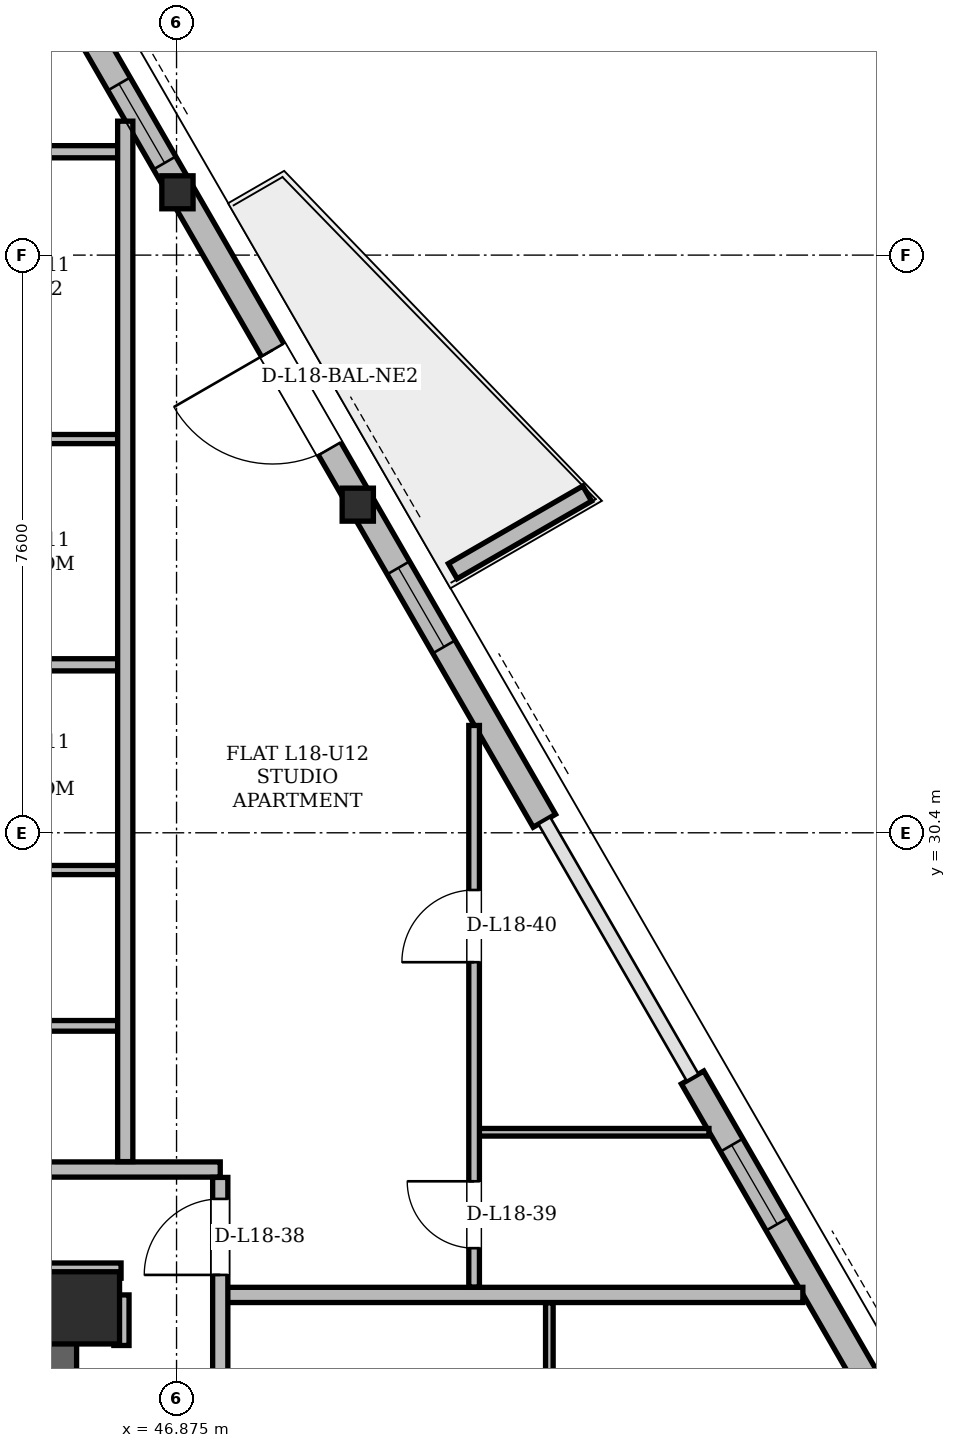
"""IFC4 building model, lengths in metres.
Left out: names, types, materials, properties, quantities, classifications, styles, units other than length and angle.
Written with IfcOpenShell. Run it as: python <this file> out.ifc"""

import sys

from ifc_helpers import new_model, si_unit, direction, frame, frame_2d, origin, origin_2d, place, context, subcontext, project, spatial, polyline, rectangle, hollow_rectangle, i_section, outline, extrude, element, fill, save


model = new_model("IFC4")
c1 = context("Model", 3, precision=1e-05, world=origin(), true_north=direction((0.0, 1.0)))
c2 = subcontext(c1, "Body", "Model", "MODEL_VIEW")
j1 = project(units=[si_unit("LENGTHUNIT", "METRE"), si_unit("PLANEANGLEUNIT", "RADIAN")], contexts=[c1])
p1 = place(None, origin())
s1 = spatial("IfcSite", under=j1, at=p1, CompositionType="ELEMENT")
p2 = place(p1, origin())
s2 = spatial("IfcBuilding", under=s1, at=p2, CompositionType="ELEMENT")
p3 = place(p2, frame((0.0, 0.0, 70.5)))
s3 = spatial("IfcBuildingStorey", under=s2, at=p3, CompositionType="ELEMENT", Elevation=70.5)
p4 = place(p3, frame((45.65, 24.15, 0.0), z_axis=(0.0, 0.0, 1.0), x_axis=(1.0, 0.0, 0.0)))
e1 = element("IfcColumn", 1, at=p4, inside=s3, PredefinedType="COLUMN", context=c2, shape_type="SweptSolid", body=[
    extrude(hollow_rectangle(XDim=0.95, YDim=0.95, WallThickness=0.08, at=origin_2d()), origin(), (0.0, 0.0, 1.0), 3.6),
])
p5 = place(p3, frame((49.304, 34.733, 0.004), z_axis=(-0.025009878433, -0.008902973029, 0.999647559419), x_axis=(0.335363176575, -0.942088923509, 0.0)))
e2 = element("IfcColumn", 2, at=p5, inside=s3, PredefinedType="COLUMN", context=c2, shape_type="SweptSolid", body=[
    extrude(i_section(OverallWidth=0.411, OverallDepth=0.434, WebThickness=0.036, FlangeThickness=0.057, at=origin_2d()), origin(), (0.0, 0.0, 1.0), 3.592),
])
p6 = place(p3, frame((46.935, 38.837, 0.004), z_axis=(-0.026708337266, -0.005912532677, 0.99962578332), x_axis=(0.216141230312, -0.976362109342, 0.0)))
e3 = element("IfcColumn", 3, at=p6, inside=s3, PredefinedType="COLUMN", context=c2, shape_type="SweptSolid", body=[
    extrude(i_section(OverallWidth=0.411, OverallDepth=0.434, WebThickness=0.036, FlangeThickness=0.057, at=origin_2d()), origin(), (0.0, 0.0, 1.0), 3.593),
])
p7 = place(p3, frame((45.31, 11.0, 0.0), z_axis=(0.0, 0.0, 1.0), x_axis=(0.0, 1.0, 0.0)))
e4 = element("IfcWall", 4, at=p7, inside=s3, PredefinedType="SHEAR", context=c2, shape_type="SweptSolid", body=[
    extrude(rectangle(XDim=13.3, YDim=0.5, at=frame_2d((6.65, 0.0))), origin(), (0.0, 0.0, 1.0), 3.36),
])
p8 = place(p3, frame((29.65, 24.15, 0.0), z_axis=(0.0, 0.0, 1.0), x_axis=(1.0, 0.0, 0.0)))
e5 = element("IfcWall", 5, at=p8, inside=s3, PredefinedType="SHEAR", context=c2, shape_type="SweptSolid", body=[
    extrude(rectangle(XDim=15.7, YDim=0.3, at=frame_2d((7.85, 0.0))), origin(), (0.0, 0.0, 1.0), 3.36),
])
p9 = place(p8, frame((1.7, 0.0, 0.0)))
e6 = element("IfcOpeningElement", 6, at=p9, cuts=e5, PredefinedType="OPENING", context=c2, shape_type="SweptSolid", body=[
    extrude(rectangle(XDim=1.2, YDim=2.2, at=frame_2d((0.6, 1.1))), frame((0.0, 0.15, 0.0), z_axis=(0.0, -1.0, 0.0), x_axis=(1.0, 0.0, 0.0)), (0.0, 0.0, 1.0), 0.3),
])
p10 = place(p8, frame((12.8, 0.0, 0.0)))
e7 = element("IfcOpeningElement", 7, at=p10, cuts=e5, PredefinedType="OPENING", context=c2, shape_type="SweptSolid", body=[
    extrude(rectangle(XDim=1.2, YDim=2.2, at=frame_2d((0.6, 1.1))), frame((0.0, 0.15, 0.0), z_axis=(0.0, -1.0, 0.0), x_axis=(1.0, 0.0, 0.0)), (0.0, 0.0, 1.0), 0.3),
])
p11 = place(p8, frame((7.4, 0.0, 0.0)))
e8 = element("IfcOpeningElement", 8, at=p11, cuts=e5, PredefinedType="OPENING", context=c2, shape_type="SweptSolid", body=[
    extrude(rectangle(XDim=0.9, YDim=2.05, at=frame_2d((0.45, 1.025))), frame((0.0, 0.15, 0.0), z_axis=(0.0, -1.0, 0.0), x_axis=(1.0, 0.0, 0.0)), (0.0, 0.0, 1.0), 0.3),
])
p12 = place(p3, frame((61.152, 14.212, 0.0), z_axis=(0.0, 0.0, 1.0), x_axis=(-0.499999987774, 0.866025410843, 0.0)))
e9 = element("IfcWall", 9, at=p12, inside=s3, PredefinedType="SOLIDWALL", context=c2, shape_type="SweptSolid", body=[
    extrude(rectangle(XDim=14.976, YDim=0.34, at=frame_2d((7.488, 0.0))), origin(), (0.0, 0.0, 1.0), 2.494),
])
p13 = place(p12, frame((6.369, 0.0, 0.0)))
e10 = element("IfcOpeningElement", 10, at=p13, cuts=e9, PredefinedType="OPENING", context=c2, shape_type="SweptSolid", body=[
    extrude(rectangle(XDim=1.5, YDim=2.2, at=frame_2d((0.75, 1.1))), frame((0.0, 0.17, 0.0), z_axis=(0.0, -1.0, 0.0), x_axis=(1.0, 0.0, 0.0)), (0.0, 0.0, 1.0), 0.34),
])
p14 = place(p12, frame((1.458, 0.0, 0.85)))
e11 = element("IfcOpeningElement", 11, at=p14, cuts=e9, PredefinedType="OPENING", context=c2, shape_type="SweptSolid", body=[
    extrude(rectangle(XDim=2.2, YDim=1.534, at=frame_2d((1.1, 0.767))), frame((0.0, 0.17, 0.0), z_axis=(0.0, -1.0, 0.0), x_axis=(1.0, 0.0, 0.0)), (0.0, 0.0, 1.0), 0.34),
])
p15 = place(p12, frame((12.748, 0.0, 0.85)))
e12 = element("IfcOpeningElement", 12, at=p15, cuts=e9, PredefinedType="OPENING", context=c2, shape_type="SweptSolid", body=[
    extrude(rectangle(XDim=1.2, YDim=1.48, at=frame_2d((0.6, 0.74))), frame((0.0, 0.17, 0.0), z_axis=(0.0, -1.0, 0.0), x_axis=(1.0, 0.0, 0.0)), (0.0, 0.0, 1.0), 0.34),
])
p16 = place(p3, frame((51.715, 30.558, 0.0), z_axis=(0.0, 0.0, 1.0), x_axis=(-0.499992928635, 0.8660294864, 0.0)))
e13 = element("IfcWall", 13, at=p16, inside=s3, PredefinedType="SOLIDWALL", context=c2, shape_type="SweptSolid", body=[
    extrude(rectangle(XDim=14.976, YDim=0.34, at=frame_2d((7.488, 0.0))), origin(), (0.0, 0.0, 1.0), 2.494),
])
p17 = place(p16, frame((5.651, 0.0, 0.0)))
e14 = element("IfcOpeningElement", 14, at=p17, cuts=e13, PredefinedType="OPENING", context=c2, shape_type="SweptSolid", body=[
    extrude(rectangle(XDim=1.5, YDim=2.2, at=frame_2d((0.75, 1.1))), frame((0.0, 0.17, 0.0), z_axis=(0.0, -1.0, 0.0), x_axis=(1.0, 0.0, 0.0)), (0.0, 0.0, 1.0), 0.34),
])
p18 = place(p16, frame((12.663, 0.0, 0.85)))
e15 = element("IfcOpeningElement", 15, at=p18, cuts=e13, PredefinedType="OPENING", context=c2, shape_type="SweptSolid", body=[
    extrude(rectangle(XDim=1.2, YDim=1.48, at=frame_2d((0.6, 0.74))), frame((0.0, 0.17, 0.0), z_axis=(0.0, -1.0, 0.0), x_axis=(1.0, 0.0, 0.0)), (0.0, 0.0, 1.0), 0.34),
])
p19 = place(p16, frame((2.642, 0.0, 0.85)))
e16 = element("IfcOpeningElement", 16, at=p19, cuts=e13, PredefinedType="OPENING", context=c2, shape_type="SweptSolid", body=[
    extrude(rectangle(XDim=1.2, YDim=1.48, at=frame_2d((0.6, 0.74))), frame((0.0, 0.17, 0.0), z_axis=(0.0, -1.0, 0.0), x_axis=(1.0, 0.0, 0.0)), (0.0, 0.0, 1.0), 0.34),
])
p20 = place(p16, frame((9.993, 0.0, 0.85)))
e17 = element("IfcOpeningElement", 17, at=p20, cuts=e13, PredefinedType="OPENING", context=c2, shape_type="SweptSolid", body=[
    extrude(rectangle(XDim=1.2, YDim=1.48, at=frame_2d((0.6, 0.74))), frame((0.0, 0.17, 0.0), z_axis=(0.0, -1.0, 0.0), x_axis=(1.0, 0.0, 0.0)), (0.0, 0.0, 1.0), 0.34),
])
p21 = place(p3, frame((50.509, 33.842, 0.0), z_axis=(0.0, 0.0, 1.0), x_axis=(0.866012356593, 0.500022597718, 0.0)))
e18 = element("IfcWall", 18, at=p21, inside=s3, PredefinedType="PARAPET", context=c2, shape_type="SweptSolid", body=[
    extrude(outline(polyline([(0.0, 0.0), (2.042, 0.0), (2.042, 1.1), (0.0, 1.32), (0.0, 0.0)])), frame((0.0, 0.115, 0.0), z_axis=(0.0, -1.0, 0.0), x_axis=(1.0, 0.0, 0.0)), (0.0, 0.0, 1.0), 0.23),
])
p22 = place(p3, frame((47.45, 24.32, 0.0), z_axis=(0.0, 0.0, 1.0), x_axis=(1.0, 0.0, 0.0)))
e19 = element("IfcWall", 19, at=p22, inside=s3, PredefinedType="PARTITIONING", context=c2, shape_type="SweptSolid", body=[
    extrude(rectangle(XDim=7.666, YDim=0.2, at=frame_2d((3.833, 0.0))), origin(), (0.0, 0.0, 1.0), 2.494),
])
p23 = place(p3, frame((45.155, 24.64, 0.0), z_axis=(0.0, 0.0, 1.0), x_axis=(1.0, 0.0, 0.0)))
e20 = element("IfcWall", 20, at=p23, inside=s3, PredefinedType="PARTITIONING", context=c2, shape_type="SweptSolid", body=[
    extrude(rectangle(XDim=0.99, YDim=0.2, at=frame_2d((0.495, 0.0))), origin(), (0.0, 0.0, 1.0), 2.738),
])
p24 = place(p3, frame((27.55, 25.97, 0.0), z_axis=(0.0, 0.0, 1.0), x_axis=(1.0, 0.0, 0.0)))
e21 = element("IfcWall", 21, at=p24, inside=s3, PredefinedType="PARTITIONING", context=c2, shape_type="SweptSolid", body=[
    extrude(rectangle(XDim=19.9, YDim=0.2, at=frame_2d((9.95, 0.0))), origin(), (0.0, 0.0, 1.0), 2.738),
])
p25 = place(p24, frame((0.425, 0.0, 0.0)))
e22 = element("IfcOpeningElement", 22, at=p25, cuts=e21, PredefinedType="OPENING", context=c2, shape_type="SweptSolid", body=[
    extrude(rectangle(XDim=1.0, YDim=2.18, at=frame_2d((0.5, 1.09))), frame((0.0, 0.1, 0.0), z_axis=(0.0, -1.0, 0.0), x_axis=(1.0, 0.0, 0.0)), (0.0, 0.0, 1.0), 0.2),
])
p26 = place(p24, frame((4.347, 0.0, 0.0)))
e23 = element("IfcOpeningElement", 23, at=p26, cuts=e21, PredefinedType="OPENING", context=c2, shape_type="SweptSolid", body=[
    extrude(rectangle(XDim=1.0, YDim=2.18, at=frame_2d((0.5, 1.09))), frame((0.0, 0.1, 0.0), z_axis=(0.0, -1.0, 0.0), x_axis=(1.0, 0.0, 0.0)), (0.0, 0.0, 1.0), 0.2),
])
p27 = place(p24, frame((12.208, 0.0, 0.0)))
e24 = element("IfcOpeningElement", 24, at=p27, cuts=e21, PredefinedType="OPENING", context=c2, shape_type="SweptSolid", body=[
    extrude(rectangle(XDim=1.0, YDim=2.18, at=frame_2d((0.5, 1.09))), frame((0.0, 0.1, 0.0), z_axis=(0.0, -1.0, 0.0), x_axis=(1.0, 0.0, 0.0)), (0.0, 0.0, 1.0), 0.2),
])
p28 = place(p3, frame((50.793, 26.46, 0.0), z_axis=(0.0, 0.0, 1.0), x_axis=(1.0, 0.0, 0.0)))
e25 = element("IfcWall", 25, at=p28, inside=s3, PredefinedType="PARTITIONING", context=c2, shape_type="SweptSolid", body=[
    extrude(rectangle(XDim=3.087, YDim=0.1, at=frame_2d((1.543, 0.0))), origin(), (0.0, 0.0, 1.0), 3.36),
])
p29 = place(p3, frame((41.87, 27.86, 0.0), z_axis=(0.0, 0.0, 1.0), x_axis=(1.0, 0.0, 0.0)))
e26 = element("IfcWall", 26, at=p29, inside=s3, PredefinedType="PARTITIONING", context=c2, shape_type="SweptSolid", body=[
    extrude(rectangle(XDim=4.38, YDim=0.14, at=frame_2d((2.19, 0.0))), origin(), (0.0, 0.0, 1.0), 2.738),
])
p30 = place(p3, frame((41.87, 29.91, 0.0), z_axis=(0.0, 0.0, 1.0), x_axis=(1.0, 0.0, 0.0)))
e27 = element("IfcWall", 27, at=p30, inside=s3, PredefinedType="PARTITIONING", context=c2, shape_type="SweptSolid", body=[
    extrude(rectangle(XDim=4.38, YDim=0.12, at=frame_2d((2.19, 0.0))), origin(), (0.0, 0.0, 1.0), 2.738),
])
p31 = place(p3, frame((41.87, 32.61, 0.0), z_axis=(0.0, 0.0, 1.0), x_axis=(1.0, 0.0, 0.0)))
e28 = element("IfcWall", 28, at=p31, inside=s3, PredefinedType="PARTITIONING", context=c2, shape_type="SweptSolid", body=[
    extrude(rectangle(XDim=4.38, YDim=0.16, at=frame_2d((2.19, 0.0))), origin(), (0.0, 0.0, 1.0), 2.738),
])
p32 = place(p3, frame((41.87, 35.58, 0.0), z_axis=(0.0, 0.0, 1.0), x_axis=(1.0, 0.0, 0.0)))
e29 = element("IfcWall", 29, at=p32, inside=s3, PredefinedType="PARTITIONING", context=c2, shape_type="SweptSolid", body=[
    extrude(rectangle(XDim=4.38, YDim=0.12, at=frame_2d((2.19, 0.0))), origin(), (0.0, 0.0, 1.0), 2.738),
])
p33 = place(p3, frame((41.87, 39.36, 0.0), z_axis=(0.0, 0.0, 1.0), x_axis=(1.0, 0.0, 0.0)))
e30 = element("IfcWall", 30, at=p33, inside=s3, PredefinedType="PARTITIONING", context=c2, shape_type="SweptSolid", body=[
    extrude(rectangle(XDim=4.38, YDim=0.16, at=frame_2d((2.19, 0.0))), origin(), (0.0, 0.0, 1.0), 2.738),
])
p34 = place(p3, frame((46.15, 23.655, 0.0), z_axis=(0.0, 0.0, 1.0), x_axis=(0.0, 1.0, 0.0)))
e31 = element("IfcWall", 31, at=p34, inside=s3, PredefinedType="PARTITIONING", context=c2, shape_type="SweptSolid", body=[
    extrude(rectangle(XDim=0.665, YDim=0.2, at=frame_2d((0.333, 0.0))), origin(), (0.0, 0.0, 1.0), 2.946),
])
p35 = place(p3, frame((46.2, 26.074, 0.0), z_axis=(0.0, 0.0, 1.0), x_axis=(0.0, 1.0, 0.0)))
e32 = element("IfcWall", 32, at=p35, inside=s3, PredefinedType="PARTITIONING", context=c2, shape_type="SweptSolid", body=[
    extrude(rectangle(XDim=13.688, YDim=0.2, at=frame_2d((6.844, 0.0))), origin(), (0.0, 0.0, 1.0), 2.494),
])
p36 = place(p3, frame((47.45, 11.054, 0.0), z_axis=(0.0, 0.0, 1.0), x_axis=(0.0, 1.0, 0.0)))
e33 = element("IfcWall", 33, at=p36, inside=s3, PredefinedType="PARTITIONING", context=c2, shape_type="SweptSolid", body=[
    extrude(rectangle(XDim=14.812, YDim=0.2, at=frame_2d((7.406, 0.0))), origin(), (0.0, 0.0, 1.0), 2.738),
])
p37 = place(p36, frame((13.529, 0.0, 0.0)))
e34 = element("IfcOpeningElement", 34, at=p37, cuts=e33, PredefinedType="OPENING", context=c2, shape_type="SweptSolid", body=[
    extrude(rectangle(XDim=1.0, YDim=2.18, at=frame_2d((0.5, 1.09))), frame((0.0, 0.1, 0.0), z_axis=(0.0, -1.0, 0.0), x_axis=(1.0, 0.0, 0.0)), (0.0, 0.0, 1.0), 0.2),
])
p38 = place(p3, frame((50.79, 24.424, 0.0), z_axis=(0.0, 0.0, 1.0), x_axis=(0.0, 1.0, 0.0)))
e35 = element("IfcWall", 35, at=p38, inside=s3, PredefinedType="PARTITIONING", context=c2, shape_type="SweptSolid", body=[
    extrude(rectangle(XDim=7.388, YDim=0.14, at=frame_2d((3.694, 0.0))), origin(), (0.0, 0.0, 1.0), 2.494),
])
p39 = place(p38, frame((0.511, 0.0, 0.0)))
e36 = element("IfcOpeningElement", 36, at=p39, cuts=e35, PredefinedType="OPENING", context=c2, shape_type="SweptSolid", body=[
    extrude(rectangle(XDim=0.88, YDim=2.08, at=frame_2d((0.44, 1.04))), frame((0.0, 0.07, 0.0), z_axis=(0.0, -1.0, 0.0), x_axis=(1.0, 0.0, 0.0)), (0.0, 0.0, 1.0), 0.14),
])
p40 = place(p38, frame((4.273, 0.0, 0.0)))
e37 = element("IfcOpeningElement", 37, at=p40, cuts=e35, PredefinedType="OPENING", context=c2, shape_type="SweptSolid", body=[
    extrude(rectangle(XDim=0.95, YDim=2.1, at=frame_2d((0.475, 1.05))), frame((0.0, 0.07, 0.0), z_axis=(0.0, -1.0, 0.0), x_axis=(1.0, 0.0, 0.0)), (0.0, 0.0, 1.0), 0.14),
])
p41 = place(p3, frame((51.78, 11.054, 0.0), z_axis=(0.0, 0.0, 1.0), x_axis=(0.0, 1.0, 0.0)))
e38 = element("IfcWall", 38, at=p41, inside=s3, PredefinedType="PARTITIONING", context=c2, shape_type="SweptSolid", body=[
    extrude(rectangle(XDim=13.162, YDim=0.1, at=frame_2d((6.581, 0.0))), origin(), (0.0, 0.0, 1.0), 2.738),
])
p42 = place(p41, frame((0.386, 0.0, 0.0)))
e39 = element("IfcOpeningElement", 39, at=p42, cuts=e38, PredefinedType="OPENING", context=c2, shape_type="SweptSolid", body=[
    extrude(rectangle(XDim=0.88, YDim=2.08, at=frame_2d((0.44, 1.04))), frame((0.0, 0.05, 0.0), z_axis=(0.0, -1.0, 0.0), x_axis=(1.0, 0.0, 0.0)), (0.0, 0.0, 1.0), 0.1),
])
p43 = place(p41, frame((2.368, 0.0, 0.0)))
e40 = element("IfcOpeningElement", 40, at=p43, cuts=e38, PredefinedType="OPENING", context=c2, shape_type="SweptSolid", body=[
    extrude(rectangle(XDim=0.95, YDim=2.1, at=frame_2d((0.475, 1.05))), frame((0.0, 0.05, 0.0), z_axis=(0.0, -1.0, 0.0), x_axis=(1.0, 0.0, 0.0)), (0.0, 0.0, 1.0), 0.1),
])
p44 = place(p41, frame((8.138, 0.0, 0.0)))
e41 = element("IfcOpeningElement", 41, at=p44, cuts=e38, PredefinedType="OPENING", context=c2, shape_type="SweptSolid", body=[
    extrude(rectangle(XDim=0.92, YDim=2.12, at=frame_2d((0.46, 1.06))), frame((0.0, 0.05, 0.0), z_axis=(0.0, -1.0, 0.0), x_axis=(1.0, 0.0, 0.0)), (0.0, 0.0, 1.0), 0.1),
])
p45 = place(p15, origin())
e42 = element("IfcWindow", 42, at=p45, inside=s3, PartitioningType="SINGLE_PANEL", PredefinedType="WINDOW", context=c2, shape_type="SweptSolid", body=[
    extrude(rectangle(XDim=1.2, YDim=1.48, at=frame_2d((0.6, 0.74))), frame((0.0, 0.03, 0.0), z_axis=(0.0, -1.0, 0.0), x_axis=(1.0, 0.0, 0.0)), (0.0, 0.0, 1.0), 0.06),
])
fill(e12, e42)
p46 = place(p17, origin())
e43 = element("IfcDoor", 43, at=p46, inside=s3, OperationType="SINGLE_SWING_RIGHT", PredefinedType="DOOR", context=c2, shape_type="SweptSolid", body=[
    extrude(rectangle(XDim=1.5, YDim=2.2, at=frame_2d((0.75, 1.1))), frame((0.0, 0.025, 0.0), z_axis=(0.0, -1.0, 0.0), x_axis=(1.0, 0.0, 0.0)), (0.0, 0.0, 1.0), 0.05),
])
fill(e14, e43)
p47 = place(p19, origin())
e44 = element("IfcWindow", 44, at=p47, inside=s3, PartitioningType="SINGLE_PANEL", PredefinedType="WINDOW", context=c2, shape_type="SweptSolid", body=[
    extrude(rectangle(XDim=1.2, YDim=1.48, at=frame_2d((0.6, 0.74))), frame((0.0, 0.03, 0.0), z_axis=(0.0, -1.0, 0.0), x_axis=(1.0, 0.0, 0.0)), (0.0, 0.0, 1.0), 0.06),
])
fill(e16, e44)
p48 = place(p20, origin())
e45 = element("IfcWindow", 45, at=p48, inside=s3, PartitioningType="SINGLE_PANEL", PredefinedType="WINDOW", context=c2, shape_type="SweptSolid", body=[
    extrude(rectangle(XDim=1.2, YDim=1.48, at=frame_2d((0.6, 0.74))), frame((0.0, 0.03, 0.0), z_axis=(0.0, -1.0, 0.0), x_axis=(1.0, 0.0, 0.0)), (0.0, 0.0, 1.0), 0.06),
])
fill(e17, e45)
p49 = place(p37, origin())
e46 = element("IfcDoor", 46, at=p49, inside=s3, OperationType="SINGLE_SWING_LEFT", PredefinedType="DOOR", context=c2, shape_type="SweptSolid", body=[
    extrude(rectangle(XDim=1.0, YDim=2.18, at=frame_2d((0.5, 1.09))), frame((0.0, 0.025, 0.0), z_axis=(0.0, -1.0, 0.0), x_axis=(1.0, 0.0, 0.0)), (0.0, 0.0, 1.0), 0.05),
])
fill(e34, e46)
p50 = place(p39, origin())
e47 = element("IfcDoor", 47, at=p50, inside=s3, OperationType="SINGLE_SWING_RIGHT", PredefinedType="DOOR", context=c2, shape_type="SweptSolid", body=[
    extrude(rectangle(XDim=0.88, YDim=2.08, at=frame_2d((0.44, 1.04))), frame((0.0, 0.025, 0.0), z_axis=(0.0, -1.0, 0.0), x_axis=(1.0, 0.0, 0.0)), (0.0, 0.0, 1.0), 0.05),
])
fill(e36, e47)
p51 = place(p40, origin())
e48 = element("IfcDoor", 48, at=p51, inside=s3, OperationType="SINGLE_SWING_LEFT", PredefinedType="DOOR", context=c2, shape_type="SweptSolid", body=[
    extrude(rectangle(XDim=0.95, YDim=2.1, at=frame_2d((0.475, 1.05))), frame((0.0, 0.025, 0.0), z_axis=(0.0, -1.0, 0.0), x_axis=(1.0, 0.0, 0.0)), (0.0, 0.0, 1.0), 0.05),
])
fill(e37, e48)
save(model, sys.argv[1])
